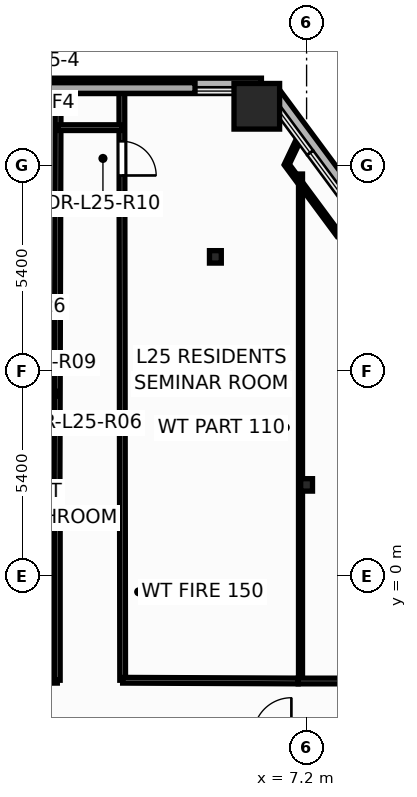
"""IFC4 building model, lengths in metres.
Left out: names, types, materials, properties, quantities, classifications, styles, units other than length and angle.
Written with IfcOpenShell. Run it as: python <this file> out.ifc"""

import sys

from ifc_helpers import new_model, si_unit, direction, frame, frame_2d, origin, origin_2d, place, context, subcontext, project, spatial, rectangle, hollow_rectangle, i_section, extrude, element, fill, save


model = new_model("IFC4")
c1 = context("Model", 3, precision=1e-05, world=origin(), true_north=direction((0.0, 1.0)))
c2 = subcontext(c1, "Body", "Model", "MODEL_VIEW")
j1 = project(units=[si_unit("LENGTHUNIT", "METRE"), si_unit("PLANEANGLEUNIT", "RADIAN")], contexts=[c1])
p1 = place(None, origin())
s1 = spatial("IfcSite", under=j1, at=p1, CompositionType="ELEMENT")
p2 = place(p1, origin())
s2 = spatial("IfcBuilding", under=s1, at=p2, CompositionType="ELEMENT")
p3 = place(p2, frame((0.0, 0.0, 99.6)))
s3 = spatial("IfcBuildingStorey", under=s2, at=p3, CompositionType="ELEMENT", Elevation=99.6)
p4 = place(p3, frame((5.89, 12.362, 0.0), z_axis=(0.0, 0.0, 1.0), x_axis=(1.0, 0.0, 0.0)))
e1 = element("IfcColumn", 1, at=p4, inside=s3, PredefinedType="COLUMN", context=c2, shape_type="SweptSolid", body=[
    extrude(hollow_rectangle(XDim=1.2, YDim=1.2, WallThickness=0.055, at=origin_2d()), origin(), (0.0, 0.0, 1.0), 3.6),
])
for number, where, z_axis, x_axis in (
    (2, (7.2, 2.4, 0.0), (0.0, 0.0, 1.0), (1.0, 0.0, 0.0)),
    (3, (4.8, 8.4, 0.0), (0.0, 0.0, 1.0), (1.0, 0.0, 0.0)),
):
    element("IfcColumn", number, at=place(p3, frame(where, z_axis=z_axis, x_axis=x_axis)), inside=s3, PredefinedType="COLUMN", context=c2, shape_type="SweptSolid", body=[
        extrude(i_section(OverallWidth=0.311, OverallDepth=0.327, WebThickness=0.016, FlangeThickness=0.025, at=origin_2d()), origin(), (0.0, 0.0, 1.0), 3.6),
    ])
p5 = place(p3, frame((14.153, 2.139, -0.2), z_axis=(0.0, 0.0, 1.0), x_axis=(-0.594915583051, 0.803788186678, 0.0)))
e4 = element("IfcWall", 4, at=p5, inside=s3, PredefinedType="PARAPET", context=c2, shape_type="SweptSolid", body=[
    extrude(rectangle(XDim=13.215, YDim=0.36, at=frame_2d((6.607, 0.0))), origin(), (0.0, 0.0, 1.0), 0.38),
])
p6 = place(p3, frame((6.012, 12.922, -0.2), z_axis=(0.0, 0.0, 1.0), x_axis=(-1.0, 0.0, 0.0)))
e5 = element("IfcWall", 5, at=p6, inside=s3, PredefinedType="PARAPET", context=c2, shape_type="SweptSolid", body=[
    extrude(rectangle(XDim=12.023, YDim=0.36, at=frame_2d((6.012, 0.0))), origin(), (0.0, 0.0, 1.0), 0.38),
])
p7 = place(p3, frame((2.339, 12.762, 0.0), z_axis=(0.0, 0.0, 1.0), x_axis=(0.001385890916, -0.999999039653, 0.0)))
e6 = element("IfcWall", 6, at=p7, inside=s3, PredefinedType="PARTITIONING", context=c2, shape_type="SweptSolid", body=[
    extrude(rectangle(XDim=15.502, YDim=0.15, at=frame_2d((7.751, 0.0))), origin(), (0.0, 0.0, 1.0), 2.325),
])
p8 = place(p7, frame((1.322, 0.0, 0.0)))
e7 = element("IfcOpeningElement", 7, at=p8, cuts=e6, PredefinedType="OPENING", context=c2, shape_type="SweptSolid", body=[
    extrude(rectangle(XDim=0.906, YDim=2.104, at=frame_2d((0.45, 1.052))), frame((0.0, 0.085, 0.0), z_axis=(0.0, -1.0, 0.0), x_axis=(1.0, 0.0, 0.0)), (0.0, 0.0, 1.0), 0.17),
])
p9 = place(p3, frame((7.04, -2.76, 0.0), z_axis=(0.0, 0.0, 1.0), x_axis=(0.0, 1.0, 0.0)))
e8 = element("IfcWall", 8, at=p9, inside=s3, PredefinedType="PARTITIONING", context=c2, shape_type="SweptSolid", body=[
    extrude(rectangle(XDim=13.34, YDim=0.105, at=frame_2d((6.67, 0.0))), origin(), (0.0, 0.0, 1.0), 2.325),
])
p10 = place(p3, frame((0.632, 1.98, 0.0), z_axis=(0.0, 0.0, 1.0), x_axis=(0.002830348232, 0.999995994556, 0.0)))
e9 = element("IfcWall", 9, at=p10, inside=s3, PredefinedType="PARTITIONING", context=c2, shape_type="SweptSolid", body=[
    extrude(rectangle(XDim=10.782, YDim=0.15, at=frame_2d((5.391, 0.0))), origin(), (0.0, 0.0, 1.0), 2.325),
])
p11 = place(p3, frame((-5.6, -2.76, 0.0), z_axis=(0.0, 0.0, 1.0), x_axis=(0.999994853563, 0.003208246723, 0.0)))
e10 = element("IfcWall", 10, at=p11, inside=s3, PredefinedType="PARTITIONING", context=c2, shape_type="SweptSolid", body=[
    extrude(rectangle(XDim=6.24, YDim=0.15, at=frame_2d((3.12, 0.0))), origin(), (0.0, 0.0, 1.0), 2.325),
])
p12 = place(p11, frame((0.439, 0.0, 0.0)))
e11 = element("IfcOpeningElement", 11, at=p12, cuts=e10, PredefinedType="OPENING", context=c2, shape_type="SweptSolid", body=[
    extrude(rectangle(XDim=0.906, YDim=2.104, at=frame_2d((0.45, 1.052))), frame((0.0, 0.085, 0.0), z_axis=(0.0, -1.0, 0.0), x_axis=(1.0, 0.0, 0.0)), (0.0, 0.0, 1.0), 0.17),
])
p13 = place(p3, frame((6.98, -2.76, 0.0), z_axis=(0.0, 0.0, 1.0), x_axis=(1.0, 0.0, 0.0)))
e12 = element("IfcWall", 12, at=p13, inside=s3, PredefinedType="PARTITIONING", context=c2, shape_type="SweptSolid", body=[
    extrude(rectangle(XDim=5.52, YDim=0.15, at=frame_2d((2.76, 0.0))), origin(), (0.0, 0.0, 1.0), 2.325),
])
p14 = place(p13, frame((1.792, 0.0, 0.0)))
e13 = element("IfcOpeningElement", 13, at=p14, cuts=e12, PredefinedType="OPENING", context=c2, shape_type="SweptSolid", body=[
    extrude(rectangle(XDim=0.906, YDim=2.104, at=frame_2d((0.45, 1.052))), frame((0.0, 0.085, 0.0), z_axis=(0.0, -1.0, 0.0), x_axis=(1.0, 0.0, 0.0)), (0.0, 0.0, 1.0), 0.17),
])
p15 = place(p3, frame((0.64, -2.74, 0.0), z_axis=(0.0, 0.0, 1.0), x_axis=(0.0, 1.0, 0.0)))
e14 = element("IfcWall", 14, at=p15, inside=s3, PredefinedType="PARTITIONING", context=c2, shape_type="SweptSolid", body=[
    extrude(rectangle(XDim=4.718, YDim=0.15, at=frame_2d((2.359, 0.0))), origin(), (0.0, 0.0, 1.0), 3.35),
])
p16 = place(p3, frame((2.36, -2.74, 0.0), z_axis=(0.0, 0.0, 1.0), x_axis=(0.999991056007, -0.0042294097, 0.0)))
e15 = element("IfcWall", 15, at=p16, inside=s3, PredefinedType="PARTITIONING", context=c2, shape_type="SweptSolid", body=[
    extrude(rectangle(XDim=4.618, YDim=0.15, at=frame_2d((2.309, 0.0))), origin(), (0.0, 0.0, 1.0), 2.918),
])
p17 = place(p3, frame((8.042, 8.984, 0.0), z_axis=(0.0, 0.0, 1.0), x_axis=(-0.594914508596, 0.803788981924, 0.0)))
e16 = element("IfcWall", 16, at=p17, inside=s3, PredefinedType="PARTITIONING", context=c2, shape_type="SweptSolid", body=[
    extrude(rectangle(XDim=2.294, YDim=0.12, at=frame_2d((1.147, 0.0))), origin(), (0.0, 0.0, 1.0), 3.35),
])
p18 = place(p3, frame((-0.758, 2.04, 0.0), z_axis=(0.0, 0.0, 1.0), x_axis=(1.0, 0.0, 0.0)))
e17 = element("IfcWall", 17, at=p18, inside=s3, PredefinedType="PARTITIONING", context=c2, shape_type="SweptSolid", body=[
    extrude(rectangle(XDim=1.398, YDim=0.135, at=frame_2d((0.699, 0.0))), origin(), (0.0, 0.0, 1.0), 2.325),
])
p19 = place(p3, frame((-0.82, 4.8, 0.0), z_axis=(0.0, 0.0, 1.0), x_axis=(1.0, 0.0, 0.0)))
e18 = element("IfcWall", 18, at=p19, inside=s3, PredefinedType="PARTITIONING", context=c2, shape_type="SweptSolid", body=[
    extrude(rectangle(XDim=1.46, YDim=0.135, at=frame_2d((0.73, 0.0))), origin(), (0.0, 0.0, 1.0), 2.325),
])
p20 = place(p3, frame((0.66, 11.8, 0.0), z_axis=(0.0, 0.0, 1.0), x_axis=(1.0, 0.0, 0.0)))
e19 = element("IfcWall", 19, at=p20, inside=s3, PredefinedType="PARTITIONING", context=c2, shape_type="SweptSolid", body=[
    extrude(rectangle(XDim=1.68, YDim=0.15, at=frame_2d((0.84, 0.0))), origin(), (0.0, 0.0, 1.0), 3.35),
])
p21 = place(p3, frame((6.677, 10.828, 0.0), z_axis=(0.0, 0.0, 1.0), x_axis=(0.429247003256, 0.903187140185, 0.0)))
e20 = element("IfcWall", 20, at=p21, inside=s3, PredefinedType="PARTITIONING", context=c2, shape_type="SweptSolid", body=[
    extrude(rectangle(XDim=0.759, YDim=0.12, at=frame_2d((0.38, 0.0))), origin(), (0.0, 0.0, 1.0), 2.713),
])
p22 = place(p3, frame((8.58, 9.383, 0.0), z_axis=(0.0, 0.0, 1.0), x_axis=(-0.803615295139, -0.595149105198, 0.0)))
e21 = element("IfcWall", 21, at=p22, inside=s3, PredefinedType="PARTITIONING", context=c2, shape_type="SweptSolid", body=[
    extrude(rectangle(XDim=0.67, YDim=0.12, at=frame_2d((0.335, 0.0))), origin(), (0.0, 0.0, 1.0), 2.713),
])
p23 = place(p8, origin())
e22 = element("IfcDoor", 22, at=p23, inside=s3, OperationType="SINGLE_SWING_RIGHT", PredefinedType="DOOR", context=c2, shape_type="SweptSolid", body=[
    extrude(rectangle(XDim=0.9, YDim=2.1, at=frame_2d((0.45, 1.05))), frame((0.0, 0.025, 0.0), z_axis=(0.0, -1.0, 0.0), x_axis=(1.0, 0.0, 0.0)), (0.0, 0.0, 1.0), 0.05),
])
fill(e7, e22)
save(model, sys.argv[1])
